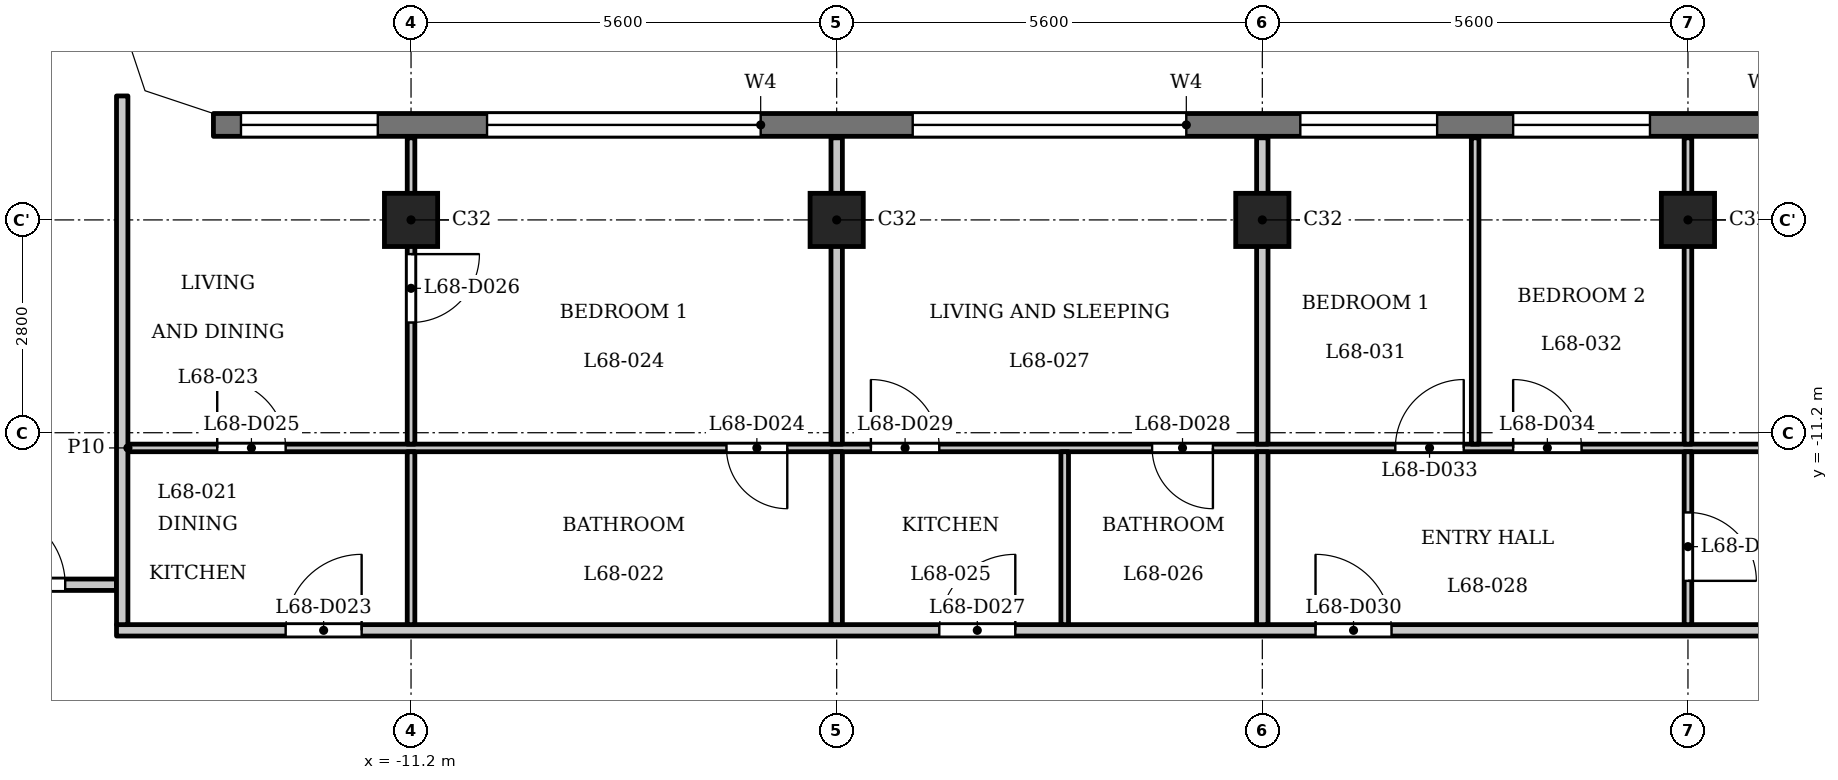
"""IFC4 building model, lengths in metres.
Left out: names, types, materials, properties, quantities, classifications, styles, units other than length and angle.
Written with IfcOpenShell. Run it as: python <this file> out.ifc"""

import sys

from ifc_helpers import new_model, si_unit, direction, frame, frame_2d, origin, origin_2d, place, context, subcontext, project, spatial, polyline, rectangle, outline, extrude, element, fill, save


model = new_model("IFC4")
c1 = context("Model", 3, precision=1e-05, world=origin(), true_north=direction((0.0, 1.0)))
c2 = subcontext(c1, "Body", "Model", "MODEL_VIEW")
j1 = project(units=[si_unit("LENGTHUNIT", "METRE"), si_unit("PLANEANGLEUNIT", "RADIAN")], contexts=[c1])
p1 = place(None, origin())
s1 = spatial("IfcSite", under=j1, at=p1, CompositionType="ELEMENT")
p2 = place(p1, origin())
s2 = spatial("IfcBuilding", under=s1, at=p2, CompositionType="ELEMENT")
p3 = place(p2, frame((0.0, 0.0, 262.7)))
s3 = spatial("IfcBuildingStorey", under=s2, at=p3, CompositionType="ELEMENT", Elevation=262.7)
for number, where, z_axis, x_axis in (
    (1, (-11.2, -8.4, 0.0), (0.0, 0.0, 1.0), (1.0, 0.0, 0.0)),
    (2, (-5.6, -8.4, 0.0), (0.0, 0.0, 1.0), (1.0, 0.0, 0.0)),
    (3, (0.0, -8.4, 0.0), (0.0, 0.0, 1.0), (1.0, 0.0, 0.0)),
    (4, (5.6, -8.4, 0.0), (0.0, 0.0, 1.0), (1.0, 0.0, 0.0)),
):
    element("IfcColumn", number, at=place(p3, frame(where, z_axis=z_axis, x_axis=x_axis)), inside=s3, PredefinedType="COLUMN", context=c2, shape_type="SweptSolid", body=[
        extrude(rectangle(XDim=0.7, YDim=0.7, at=origin_2d()), origin(), (0.0, 0.0, 1.0), 3.5),
    ])
p4 = place(p3, frame((13.8, -7.15, 0.0), z_axis=(0.0, 0.0, 1.0), x_axis=(-1.0, 0.0, 0.0)))
e5 = element("IfcWall", 5, at=p4, inside=s3, PredefinedType="SOLIDWALL", context=c2, shape_type="SweptSolid", body=[
    extrude(rectangle(XDim=27.6, YDim=0.3, at=frame_2d((13.8, 0.0))), origin(), (0.0, 0.0, 1.0), 3.2),
])
p5 = place(p4, frame((0.363, 0.0, 0.9)))
e6 = element("IfcOpeningElement", 6, at=p5, cuts=e5, PredefinedType="OPENING", context=c2, shape_type="SweptSolid", body=[
    extrude(rectangle(XDim=1.8, YDim=1.25, at=frame_2d((0.9, 0.625))), frame((0.0, 0.16, 0.0), z_axis=(0.0, -1.0, 0.0), x_axis=(1.0, 0.0, 0.0)), (0.0, 0.0, 1.0), 0.32),
])
p6 = place(p4, frame((3.6, 0.0, 1.2)))
e7 = element("IfcOpeningElement", 7, at=p6, cuts=e5, PredefinedType="OPENING", context=c2, shape_type="SweptSolid", body=[
    extrude(rectangle(XDim=3.6, YDim=0.95, at=frame_2d((1.8, 0.475))), frame((0.0, 0.16, 0.0), z_axis=(0.0, -1.0, 0.0), x_axis=(1.0, 0.0, 0.0)), (0.0, 0.0, 1.0), 0.32),
])
p7 = place(p4, frame((8.7, 0.0, 0.9)))
e8 = element("IfcOpeningElement", 8, at=p7, cuts=e5, PredefinedType="OPENING", context=c2, shape_type="SweptSolid", body=[
    extrude(rectangle(XDim=1.8, YDim=1.25, at=frame_2d((0.9, 0.625))), frame((0.0, 0.16, 0.0), z_axis=(0.0, -1.0, 0.0), x_axis=(1.0, 0.0, 0.0)), (0.0, 0.0, 1.0), 0.32),
])
p8 = place(p4, frame((11.5, 0.0, 0.9)))
e9 = element("IfcOpeningElement", 9, at=p8, cuts=e5, PredefinedType="OPENING", context=c2, shape_type="SweptSolid", body=[
    extrude(rectangle(XDim=1.8, YDim=1.25, at=frame_2d((0.9, 0.625))), frame((0.0, 0.16, 0.0), z_axis=(0.0, -1.0, 0.0), x_axis=(1.0, 0.0, 0.0)), (0.0, 0.0, 1.0), 0.32),
])
p9 = place(p4, frame((14.8, 0.0, 1.2)))
e10 = element("IfcOpeningElement", 10, at=p9, cuts=e5, PredefinedType="OPENING", context=c2, shape_type="SweptSolid", body=[
    extrude(rectangle(XDim=3.6, YDim=0.95, at=frame_2d((1.8, 0.475))), frame((0.0, 0.16, 0.0), z_axis=(0.0, -1.0, 0.0), x_axis=(1.0, 0.0, 0.0)), (0.0, 0.0, 1.0), 0.32),
])
p10 = place(p4, frame((20.4, 0.0, 1.2)))
e11 = element("IfcOpeningElement", 11, at=p10, cuts=e5, PredefinedType="OPENING", context=c2, shape_type="SweptSolid", body=[
    extrude(rectangle(XDim=3.6, YDim=0.95, at=frame_2d((1.8, 0.475))), frame((0.0, 0.16, 0.0), z_axis=(0.0, -1.0, 0.0), x_axis=(1.0, 0.0, 0.0)), (0.0, 0.0, 1.0), 0.32),
])
p11 = place(p4, frame((25.438, 0.0, 0.9)))
e12 = element("IfcOpeningElement", 12, at=p11, cuts=e5, PredefinedType="OPENING", context=c2, shape_type="SweptSolid", body=[
    extrude(rectangle(XDim=1.8, YDim=1.25, at=frame_2d((0.9, 0.625))), frame((0.0, 0.16, 0.0), z_axis=(0.0, -1.0, 0.0), x_axis=(1.0, 0.0, 0.0)), (0.0, 0.0, 1.0), 0.32),
])
p12 = place(p3, frame((-15.075, -13.8, 0.0), z_axis=(0.0, 0.0, 1.0), x_axis=(1.0, 0.0, 0.0)))
e13 = element("IfcWall", 13, at=p12, inside=s3, PredefinedType="PARTITIONING", context=c2, shape_type="SweptSolid", body=[
    extrude(rectangle(XDim=30.15, YDim=0.15, at=frame_2d((15.075, 0.0))), origin(), (0.0, 0.0, 1.0), 3.2),
])
p13 = place(p12, frame((2.225, 0.0, 0.0)))
e14 = element("IfcOpeningElement", 14, at=p13, cuts=e13, PredefinedType="OPENING", context=c2, shape_type="SweptSolid", body=[
    extrude(rectangle(XDim=1.0, YDim=2.1, at=frame_2d((0.5, 1.05))), frame((0.0, 0.085, 0.0), z_axis=(0.0, -1.0, 0.0), x_axis=(1.0, 0.0, 0.0)), (0.0, 0.0, 1.0), 0.17),
])
p14 = place(p12, frame((10.825, 0.0, 0.0)))
e15 = element("IfcOpeningElement", 15, at=p14, cuts=e13, PredefinedType="OPENING", context=c2, shape_type="SweptSolid", body=[
    extrude(rectangle(XDim=1.0, YDim=2.1, at=frame_2d((0.5, 1.05))), frame((0.0, 0.085, 0.0), z_axis=(0.0, -1.0, 0.0), x_axis=(1.0, 0.0, 0.0)), (0.0, 0.0, 1.0), 0.17),
])
p15 = place(p12, frame((15.775, 0.0, 0.0)))
e16 = element("IfcOpeningElement", 16, at=p15, cuts=e13, PredefinedType="OPENING", context=c2, shape_type="SweptSolid", body=[
    extrude(rectangle(XDim=1.0, YDim=2.1, at=frame_2d((0.5, 1.05))), frame((0.0, 0.085, 0.0), z_axis=(0.0, -1.0, 0.0), x_axis=(1.0, 0.0, 0.0)), (0.0, 0.0, 1.0), 0.17),
])
p16 = place(p3, frame((-17.4, -13.2, 0.0), z_axis=(0.0, 0.0, 1.0), x_axis=(1.0, 0.0, 0.0)))
e17 = element("IfcWall", 17, at=p16, inside=s3, PredefinedType="PARTITIONING", context=c2, shape_type="SweptSolid", body=[
    extrude(rectangle(XDim=2.325, YDim=0.15, at=frame_2d((1.163, 0.0))), origin(), (0.0, 0.0, 1.0), 3.2),
])
p17 = place(p16, frame((0.65, 0.0, 0.0)))
e18 = element("IfcOpeningElement", 18, at=p17, cuts=e17, PredefinedType="OPENING", context=c2, shape_type="SweptSolid", body=[
    extrude(rectangle(XDim=1.0, YDim=2.1, at=frame_2d((0.5, 1.05))), frame((0.0, 0.085, 0.0), z_axis=(0.0, -1.0, 0.0), x_axis=(1.0, 0.0, 0.0)), (0.0, 0.0, 1.0), 0.17),
])
p18 = place(p3, frame((-14.925, -11.4, 0.0), z_axis=(0.0, 0.0, 1.0), x_axis=(1.0, 0.0, 0.0)))
e19 = element("IfcWall", 19, at=p18, inside=s3, PredefinedType="PARTITIONING", context=c2, shape_type="SweptSolid", body=[
    extrude(rectangle(XDim=29.85, YDim=0.1, at=frame_2d((14.925, 0.0))), origin(), (0.0, 0.0, 1.0), 3.2),
])
p19 = place(p18, frame((7.875, 0.0, 0.0)))
e20 = element("IfcOpeningElement", 20, at=p19, cuts=e19, PredefinedType="OPENING", context=c2, shape_type="SweptSolid", body=[
    extrude(rectangle(XDim=0.8, YDim=2.1, at=frame_2d((0.4, 1.05))), frame((0.0, 0.06, 0.0), z_axis=(0.0, -1.0, 0.0), x_axis=(1.0, 0.0, 0.0)), (0.0, 0.0, 1.0), 0.12),
])
p20 = place(p18, frame((1.175, 0.0, 0.0)))
e21 = element("IfcOpeningElement", 21, at=p20, cuts=e19, PredefinedType="OPENING", context=c2, shape_type="SweptSolid", body=[
    extrude(rectangle(XDim=0.9, YDim=2.1, at=frame_2d((0.45, 1.05))), frame((0.0, 0.06, 0.0), z_axis=(0.0, -1.0, 0.0), x_axis=(1.0, 0.0, 0.0)), (0.0, 0.0, 1.0), 0.12),
])
p21 = place(p18, frame((13.475, 0.0, 0.0)))
e22 = element("IfcOpeningElement", 22, at=p21, cuts=e19, PredefinedType="OPENING", context=c2, shape_type="SweptSolid", body=[
    extrude(rectangle(XDim=0.8, YDim=2.1, at=frame_2d((0.4, 1.05))), frame((0.0, 0.06, 0.0), z_axis=(0.0, -1.0, 0.0), x_axis=(1.0, 0.0, 0.0)), (0.0, 0.0, 1.0), 0.12),
])
p22 = place(p18, frame((9.775, 0.0, 0.0)))
e23 = element("IfcOpeningElement", 23, at=p22, cuts=e19, PredefinedType="OPENING", context=c2, shape_type="SweptSolid", body=[
    extrude(rectangle(XDim=0.9, YDim=2.1, at=frame_2d((0.45, 1.05))), frame((0.0, 0.06, 0.0), z_axis=(0.0, -1.0, 0.0), x_axis=(1.0, 0.0, 0.0)), (0.0, 0.0, 1.0), 0.12),
])
p23 = place(p18, frame((16.675, 0.0, 0.0)))
e24 = element("IfcOpeningElement", 24, at=p23, cuts=e19, PredefinedType="OPENING", context=c2, shape_type="SweptSolid", body=[
    extrude(rectangle(XDim=0.9, YDim=2.1, at=frame_2d((0.45, 1.05))), frame((0.0, 0.06, 0.0), z_axis=(0.0, -1.0, 0.0), x_axis=(1.0, 0.0, 0.0)), (0.0, 0.0, 1.0), 0.12),
])
p24 = place(p18, frame((18.225, 0.0, 0.0)))
e25 = element("IfcOpeningElement", 25, at=p24, cuts=e19, PredefinedType="OPENING", context=c2, shape_type="SweptSolid", body=[
    extrude(rectangle(XDim=0.9, YDim=2.1, at=frame_2d((0.45, 1.05))), frame((0.0, 0.06, 0.0), z_axis=(0.0, -1.0, 0.0), x_axis=(1.0, 0.0, 0.0)), (0.0, 0.0, 1.0), 0.12),
])
p25 = place(p18, frame((24.325, 0.0, 0.0)))
e26 = element("IfcOpeningElement", 26, at=p25, cuts=e19, PredefinedType="OPENING", context=c2, shape_type="SweptSolid", body=[
    extrude(rectangle(XDim=0.9, YDim=2.1, at=frame_2d((0.45, 1.05))), frame((0.0, 0.06, 0.0), z_axis=(0.0, -1.0, 0.0), x_axis=(1.0, 0.0, 0.0)), (0.0, 0.0, 1.0), 0.12),
])
p26 = place(p3, frame((-15.0, -13.725, 0.0), z_axis=(0.0, 0.0, 1.0), x_axis=(0.0, 1.0, 0.0)))
e27 = element("IfcWall", 27, at=p26, inside=s3, PredefinedType="PARTITIONING", context=c2, shape_type="SweptSolid", body=[
    extrude(rectangle(XDim=6.956, YDim=0.15, at=frame_2d((3.478, 0.0))), origin(), (0.0, 0.0, 1.0), 3.2),
])
p27 = place(p3, frame((-11.2, -13.725, 0.0), z_axis=(0.0, 0.0, 1.0), x_axis=(0.0, 1.0, 0.0)))
e28 = element("IfcWall", 28, at=p27, inside=s3, PredefinedType="PARTITIONING", context=c2, shape_type="SweptSolid", body=[
    extrude(rectangle(XDim=2.275, YDim=0.1, at=frame_2d((1.138, 0.0))), origin(), (0.0, 0.0, 1.0), 3.2),
])
p28 = place(p3, frame((-11.2, -11.35, 0.0), z_axis=(0.0, 0.0, 1.0), x_axis=(0.0, 1.0, 0.0)))
e29 = element("IfcWall", 29, at=p28, inside=s3, PredefinedType="PARTITIONING", context=c2, shape_type="SweptSolid", body=[
    extrude(rectangle(XDim=4.03, YDim=0.1, at=frame_2d((2.015, 0.0))), origin(), (0.0, 0.0, 1.0), 3.2),
])
p29 = place(p28, frame((1.6, 0.0, 0.0)))
e30 = element("IfcOpeningElement", 30, at=p29, cuts=e29, PredefinedType="OPENING", context=c2, shape_type="SweptSolid", body=[
    extrude(rectangle(XDim=0.9, YDim=2.1, at=frame_2d((0.45, 1.05))), frame((0.0, 0.06, 0.0), z_axis=(0.0, -1.0, 0.0), x_axis=(1.0, 0.0, 0.0)), (0.0, 0.0, 1.0), 0.12),
])
p30 = place(p3, frame((-5.6, -13.725, 0.0), z_axis=(0.0, 0.0, 1.0), x_axis=(0.0, 1.0, 0.0)))
e31 = element("IfcWall", 31, at=p30, inside=s3, PredefinedType="PARTITIONING", context=c2, shape_type="SweptSolid", body=[
    extrude(rectangle(XDim=2.275, YDim=0.15, at=frame_2d((1.138, 0.0))), origin(), (0.0, 0.0, 1.0), 3.2),
])
p31 = place(p3, frame((-5.6, -11.35, 0.0), z_axis=(0.0, 0.0, 1.0), x_axis=(0.0, 1.0, 0.0)))
e32 = element("IfcWall", 32, at=p31, inside=s3, PredefinedType="PARTITIONING", context=c2, shape_type="SweptSolid", body=[
    extrude(rectangle(XDim=4.03, YDim=0.15, at=frame_2d((2.015, 0.0))), origin(), (0.0, 0.0, 1.0), 3.2),
])
p32 = place(p3, frame((-2.6, -13.725, 0.0), z_axis=(0.0, 0.0, 1.0), x_axis=(0.0, 1.0, 0.0)))
e33 = element("IfcWall", 33, at=p32, inside=s3, PredefinedType="PARTITIONING", context=c2, shape_type="SweptSolid", body=[
    extrude(rectangle(XDim=2.275, YDim=0.1, at=frame_2d((1.138, 0.0))), origin(), (0.0, 0.0, 1.0), 3.2),
])
p33 = place(p3, frame((0.0, -13.725, 0.0), z_axis=(0.0, 0.0, 1.0), x_axis=(0.0, 1.0, 0.0)))
e34 = element("IfcWall", 34, at=p33, inside=s3, PredefinedType="PARTITIONING", context=c2, shape_type="SweptSolid", body=[
    extrude(rectangle(XDim=2.275, YDim=0.15, at=frame_2d((1.138, 0.0))), origin(), (0.0, 0.0, 1.0), 3.2),
])
p34 = place(p3, frame((0.0, -11.35, 0.0), z_axis=(0.0, 0.0, 1.0), x_axis=(0.0, 1.0, 0.0)))
e35 = element("IfcWall", 35, at=p34, inside=s3, PredefinedType="PARTITIONING", context=c2, shape_type="SweptSolid", body=[
    extrude(rectangle(XDim=4.03, YDim=0.15, at=frame_2d((2.015, 0.0))), origin(), (0.0, 0.0, 1.0), 3.2),
])
p35 = place(p3, frame((2.8, -11.35, 0.0), z_axis=(0.0, 0.0, 1.0), x_axis=(0.0, 1.0, 0.0)))
e36 = element("IfcWall", 36, at=p35, inside=s3, PredefinedType="PARTITIONING", context=c2, shape_type="SweptSolid", body=[
    extrude(rectangle(XDim=4.03, YDim=0.1, at=frame_2d((2.015, 0.0))), origin(), (0.0, 0.0, 1.0), 3.2),
])
p36 = place(p3, frame((5.6, -13.725, 0.0), z_axis=(0.0, 0.0, 1.0), x_axis=(0.0, 1.0, 0.0)))
e37 = element("IfcWall", 37, at=p36, inside=s3, PredefinedType="PARTITIONING", context=c2, shape_type="SweptSolid", body=[
    extrude(rectangle(XDim=2.275, YDim=0.1, at=frame_2d((1.138, 0.0))), origin(), (0.0, 0.0, 1.0), 3.2),
])
p37 = place(p36, frame((0.576, 0.0, 0.0)))
e38 = element("IfcOpeningElement", 38, at=p37, cuts=e37, PredefinedType="OPENING", context=c2, shape_type="SweptSolid", body=[
    extrude(rectangle(XDim=0.9, YDim=2.1, at=frame_2d((0.45, 1.05))), frame((0.0, 0.06, 0.0), z_axis=(0.0, -1.0, 0.0), x_axis=(1.0, 0.0, 0.0)), (0.0, 0.0, 1.0), 0.12),
])
p38 = place(p3, frame((5.6, -11.35, 0.0), z_axis=(0.0, 0.0, 1.0), x_axis=(0.0, 1.0, 0.0)))
e39 = element("IfcWall", 39, at=p38, inside=s3, PredefinedType="PARTITIONING", context=c2, shape_type="SweptSolid", body=[
    extrude(rectangle(XDim=4.03, YDim=0.1, at=frame_2d((2.015, 0.0))), origin(), (0.0, 0.0, 1.0), 3.2),
])
p39 = place(p3, origin())
e40 = element("IfcWall", 40, at=p39, inside=s3, PredefinedType="SOLIDWALL", context=c2, shape_type="SweptSolid", body=[
    extrude(outline(polyline([(-14.937, -6.937), (-13.849, -7.3), (-13.8, -7.3), (-13.8, -7.0), (-14.7, -6.7), (-15.0, -5.8), (-15.3, -5.8), (-15.3, -5.849), (-14.937, -6.937)])), origin(), (0.0, 0.0, 1.0), 3.2),
])
p40 = place(p17, origin())
e41 = element("IfcDoor", 41, at=p40, inside=s3, OperationType="SINGLE_SWING_RIGHT", PredefinedType="DOOR", context=c2, shape_type="SweptSolid", body=[
    extrude(rectangle(XDim=1.0, YDim=2.1, at=frame_2d((0.5, 1.05))), frame((0.0, 0.025, 0.0), z_axis=(0.0, -1.0, 0.0), x_axis=(1.0, 0.0, 0.0)), (0.0, 0.0, 1.0), 0.05),
])
fill(e18, e41)
p41 = place(p13, origin())
e42 = element("IfcDoor", 42, at=p41, inside=s3, OperationType="SINGLE_SWING_LEFT", PredefinedType="DOOR", context=c2, shape_type="SweptSolid", body=[
    extrude(rectangle(XDim=1.0, YDim=2.1, at=frame_2d((0.5, 1.05))), frame((0.0, 0.025, 0.0), z_axis=(0.0, -1.0, 0.0), x_axis=(1.0, 0.0, 0.0)), (0.0, 0.0, 1.0), 0.05),
])
fill(e14, e42)
p42 = place(p19, origin())
e43 = element("IfcDoor", 43, at=p42, inside=s3, OperationType="SINGLE_SWING_RIGHT", PredefinedType="DOOR", context=c2, shape_type="SweptSolid", body=[
    extrude(rectangle(XDim=0.8, YDim=2.1, at=frame_2d((0.4, 1.05))), frame((0.0, 0.025, 0.0), z_axis=(0.0, -1.0, 0.0), x_axis=(1.0, 0.0, 0.0)), (0.0, 0.0, 1.0), 0.05),
])
fill(e20, e43)
p43 = place(p20, origin())
e44 = element("IfcDoor", 44, at=p43, inside=s3, OperationType="SINGLE_SWING_RIGHT", PredefinedType="DOOR", context=c2, shape_type="SweptSolid", body=[
    extrude(rectangle(XDim=0.9, YDim=2.1, at=frame_2d((0.45, 1.05))), frame((0.0, 0.025, 0.0), z_axis=(0.0, -1.0, 0.0), x_axis=(1.0, 0.0, 0.0)), (0.0, 0.0, 1.0), 0.05),
])
fill(e21, e44)
p44 = place(p29, origin())
e45 = element("IfcDoor", 45, at=p44, inside=s3, OperationType="SINGLE_SWING_RIGHT", PredefinedType="DOOR", context=c2, shape_type="SweptSolid", body=[
    extrude(rectangle(XDim=0.9, YDim=2.1, at=frame_2d((0.45, 1.05))), frame((0.0, 0.025, 0.0), z_axis=(0.0, -1.0, 0.0), x_axis=(1.0, 0.0, 0.0)), (0.0, 0.0, 1.0), 0.05),
])
fill(e30, e45)
p45 = place(p14, origin())
e46 = element("IfcDoor", 46, at=p45, inside=s3, OperationType="SINGLE_SWING_LEFT", PredefinedType="DOOR", context=c2, shape_type="SweptSolid", body=[
    extrude(rectangle(XDim=1.0, YDim=2.1, at=frame_2d((0.5, 1.05))), frame((0.0, 0.025, 0.0), z_axis=(0.0, -1.0, 0.0), x_axis=(1.0, 0.0, 0.0)), (0.0, 0.0, 1.0), 0.05),
])
fill(e15, e46)
p46 = place(p21, origin())
e47 = element("IfcDoor", 47, at=p46, inside=s3, OperationType="SINGLE_SWING_RIGHT", PredefinedType="DOOR", context=c2, shape_type="SweptSolid", body=[
    extrude(rectangle(XDim=0.8, YDim=2.1, at=frame_2d((0.4, 1.05))), frame((0.0, 0.025, 0.0), z_axis=(0.0, -1.0, 0.0), x_axis=(1.0, 0.0, 0.0)), (0.0, 0.0, 1.0), 0.05),
])
fill(e22, e47)
p47 = place(p22, origin())
e48 = element("IfcDoor", 48, at=p47, inside=s3, OperationType="SINGLE_SWING_RIGHT", PredefinedType="DOOR", context=c2, shape_type="SweptSolid", body=[
    extrude(rectangle(XDim=0.9, YDim=2.1, at=frame_2d((0.45, 1.05))), frame((0.0, 0.025, 0.0), z_axis=(0.0, -1.0, 0.0), x_axis=(1.0, 0.0, 0.0)), (0.0, 0.0, 1.0), 0.05),
])
fill(e23, e48)
p48 = place(p15, origin())
e49 = element("IfcDoor", 49, at=p48, inside=s3, OperationType="SINGLE_SWING_RIGHT", PredefinedType="DOOR", context=c2, shape_type="SweptSolid", body=[
    extrude(rectangle(XDim=1.0, YDim=2.1, at=frame_2d((0.5, 1.05))), frame((0.0, 0.025, 0.0), z_axis=(0.0, -1.0, 0.0), x_axis=(1.0, 0.0, 0.0)), (0.0, 0.0, 1.0), 0.05),
])
fill(e16, e49)
p49 = place(p37, origin())
e50 = element("IfcDoor", 50, at=p49, inside=s3, OperationType="SINGLE_SWING_LEFT", PredefinedType="DOOR", context=c2, shape_type="SweptSolid", body=[
    extrude(rectangle(XDim=0.9, YDim=2.1, at=frame_2d((0.45, 1.05))), frame((0.0, 0.025, 0.0), z_axis=(0.0, -1.0, 0.0), x_axis=(1.0, 0.0, 0.0)), (0.0, 0.0, 1.0), 0.05),
])
fill(e38, e50)
p50 = place(p23, origin())
e51 = element("IfcDoor", 51, at=p50, inside=s3, OperationType="SINGLE_SWING_LEFT", PredefinedType="DOOR", context=c2, shape_type="SweptSolid", body=[
    extrude(rectangle(XDim=0.9, YDim=2.1, at=frame_2d((0.45, 1.05))), frame((0.0, 0.025, 0.0), z_axis=(0.0, -1.0, 0.0), x_axis=(1.0, 0.0, 0.0)), (0.0, 0.0, 1.0), 0.05),
])
fill(e24, e51)
p51 = place(p24, origin())
e52 = element("IfcDoor", 52, at=p51, inside=s3, OperationType="SINGLE_SWING_RIGHT", PredefinedType="DOOR", context=c2, shape_type="SweptSolid", body=[
    extrude(rectangle(XDim=0.9, YDim=2.1, at=frame_2d((0.45, 1.05))), frame((0.0, 0.025, 0.0), z_axis=(0.0, -1.0, 0.0), x_axis=(1.0, 0.0, 0.0)), (0.0, 0.0, 1.0), 0.05),
])
fill(e25, e52)
p52 = place(p7, origin())
e53 = element("IfcWindow", 53, at=p52, inside=s3, PartitioningType="SINGLE_PANEL", PredefinedType="WINDOW", context=c2, shape_type="SweptSolid", body=[
    extrude(rectangle(XDim=1.8, YDim=1.25, at=frame_2d((0.9, 0.625))), frame((0.0, 0.03, 0.0), z_axis=(0.0, -1.0, 0.0), x_axis=(1.0, 0.0, 0.0)), (0.0, 0.0, 1.0), 0.06),
])
fill(e8, e53)
p53 = place(p8, origin())
e54 = element("IfcWindow", 54, at=p53, inside=s3, PartitioningType="SINGLE_PANEL", PredefinedType="WINDOW", context=c2, shape_type="SweptSolid", body=[
    extrude(rectangle(XDim=1.8, YDim=1.25, at=frame_2d((0.9, 0.625))), frame((0.0, 0.03, 0.0), z_axis=(0.0, -1.0, 0.0), x_axis=(1.0, 0.0, 0.0)), (0.0, 0.0, 1.0), 0.06),
])
fill(e9, e54)
p54 = place(p9, origin())
e55 = element("IfcWindow", 55, at=p54, inside=s3, PartitioningType="SINGLE_PANEL", PredefinedType="WINDOW", context=c2, shape_type="SweptSolid", body=[
    extrude(rectangle(XDim=3.6, YDim=0.95, at=frame_2d((1.8, 0.475))), frame((0.0, 0.03, 0.0), z_axis=(0.0, -1.0, 0.0), x_axis=(1.0, 0.0, 0.0)), (0.0, 0.0, 1.0), 0.06),
])
fill(e10, e55)
p55 = place(p10, origin())
e56 = element("IfcWindow", 56, at=p55, inside=s3, PartitioningType="SINGLE_PANEL", PredefinedType="WINDOW", context=c2, shape_type="SweptSolid", body=[
    extrude(rectangle(XDim=3.6, YDim=0.95, at=frame_2d((1.8, 0.475))), frame((0.0, 0.03, 0.0), z_axis=(0.0, -1.0, 0.0), x_axis=(1.0, 0.0, 0.0)), (0.0, 0.0, 1.0), 0.06),
])
fill(e11, e56)
p56 = place(p11, origin())
e57 = element("IfcWindow", 57, at=p56, inside=s3, PartitioningType="SINGLE_PANEL", PredefinedType="WINDOW", context=c2, shape_type="SweptSolid", body=[
    extrude(rectangle(XDim=1.8, YDim=1.25, at=frame_2d((0.9, 0.625))), frame((0.0, 0.03, 0.0), z_axis=(0.0, -1.0, 0.0), x_axis=(1.0, 0.0, 0.0)), (0.0, 0.0, 1.0), 0.06),
])
fill(e12, e57)
save(model, sys.argv[1])
